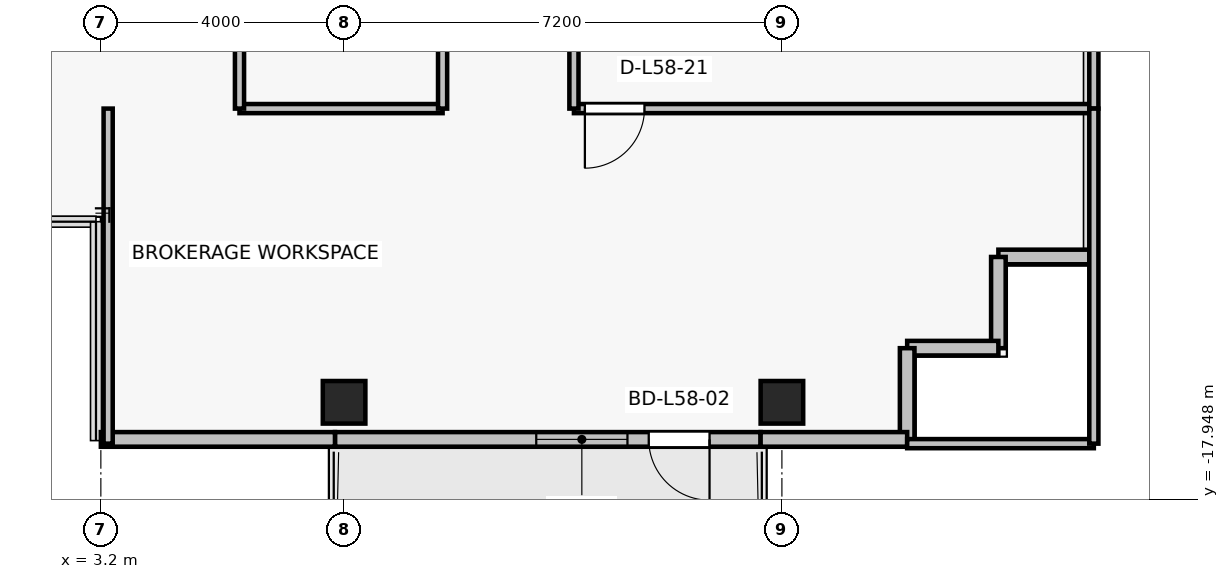
"""IFC4 building model, lengths in metres.
Left out: names, types, materials, properties, quantities, classifications, styles, units other than length and angle.
Written with IfcOpenShell. Run it as: python <this file> out.ifc"""

import sys

from ifc_helpers import new_model, si_unit, direction, frame, frame_2d, origin, origin_2d, place, context, subcontext, project, spatial, rectangle, extrude, source, transform, mapped, element, fill, save


model = new_model("IFC4")
c1 = context("Model", 3, precision=1e-05, world=origin(), true_north=direction((0.0, 1.0)))
c2 = subcontext(c1, "Body", "Model", "MODEL_VIEW")
j1 = project(units=[si_unit("LENGTHUNIT", "METRE"), si_unit("PLANEANGLEUNIT", "RADIAN")], contexts=[c1])
p1 = place(None, origin())
s1 = spatial("IfcSite", under=j1, at=p1, CompositionType="ELEMENT")
p2 = place(p1, origin())
s2 = spatial("IfcBuilding", under=s1, at=p2, CompositionType="ELEMENT")
p3 = place(p2, frame((0.0, 0.0, 208.9)))
s3 = spatial("IfcBuildingStorey", under=s2, at=p3, CompositionType="ELEMENT", Elevation=208.9)
for number, where, z_axis, x_axis in (
    (1, (7.2, -16.35, 0.0), (0.0, 0.0, 1.0), (1.0, 0.0, 0.0)),
    (2, (14.4, -16.35, 0.0), (0.0, 0.0, 1.0), (1.0, 0.0, 0.0)),
):
    element("IfcColumn", number, at=place(p3, frame(where, z_axis=z_axis, x_axis=x_axis)), inside=s3, PredefinedType="COLUMN", context=c2, shape_type="SweptSolid", body=[
        extrude(rectangle(XDim=0.7, YDim=0.7, at=origin_2d()), origin(), (0.0, 0.0, 1.0), 3.3),
    ])
p4 = place(p3, frame((14.05, -16.96, 0.0), z_axis=(0.0, 0.0, 1.0), x_axis=(-1.0, 0.0, 0.0)))
e3 = element("IfcWall", 3, at=p4, inside=s3, PredefinedType="SOLIDWALL", context=c2, shape_type="SweptSolid", body=[
    extrude(rectangle(XDim=7.0, YDim=0.24, at=frame_2d((3.5, 0.0))), origin(), (0.0, 0.0, 1.0), 2.665),
])
p5 = place(p4, frame((0.84, 0.0, 0.0)))
e4 = element("IfcOpeningElement", 4, at=p5, cuts=e3, PredefinedType="OPENING", context=c2, shape_type="SweptSolid", body=[
    extrude(rectangle(XDim=1.0, YDim=2.2, at=frame_2d((0.5, 1.1))), frame((0.0, 0.13, 0.0), z_axis=(0.0, -1.0, 0.0), x_axis=(1.0, 0.0, 0.0)), (0.0, 0.0, 1.0), 0.26),
])
p6 = place(p4, frame((2.19, 0.0, 0.85)))
e5 = element("IfcOpeningElement", 5, at=p6, cuts=e3, PredefinedType="OPENING", context=c2, shape_type="SweptSolid", body=[
    extrude(rectangle(XDim=1.5, YDim=1.6, at=frame_2d((0.75, 0.8))), frame((0.0, 0.13, 0.0), z_axis=(0.0, -1.0, 0.0), x_axis=(1.0, 0.0, 0.0)), (0.0, 0.0, 1.0), 0.26),
])
for number, where, z_axis, x_axis in (
    (6, (17.96, -13.96, 0.0), (0.0, 0.0, 1.0), (1.0, 0.0, 0.0)),
    (7, (17.96, -15.46, 0.0), (0.0, 0.0, 1.0), (0.0, 1.0, 0.0)),
    (8, (16.46, -15.46, 0.0), (0.0, 0.0, 1.0), (1.0, 0.0, 0.0)),
    (9, (16.46, -16.96, 0.0), (0.0, 0.0, 1.0), (0.0, 1.0, 0.0)),
):
    element("IfcWall", number, at=place(p3, frame(where, z_axis=z_axis, x_axis=x_axis)), inside=s3, PredefinedType="SOLIDWALL", context=c2, shape_type="SweptSolid", body=[
        extrude(rectangle(XDim=1.5, YDim=0.24, at=frame_2d((0.75, 0.0))), origin(), (0.0, 0.0, 1.0), 3.075),
    ])
p7 = place(p3, frame((14.05, -16.96, 0.0), z_axis=(0.0, 0.0, 1.0), x_axis=(1.0, 0.0, 0.0)))
e10 = element("IfcWall", 10, at=p7, inside=s3, PredefinedType="SOLIDWALL", context=c2, shape_type="SweptSolid", body=[
    extrude(rectangle(XDim=2.41, YDim=0.24, at=frame_2d((1.205, 0.0))), origin(), (0.0, 0.0, 1.0), 3.075),
])
p8 = place(p3, frame((3.2, -16.96, 0.0), z_axis=(0.0, 0.0, 1.0), x_axis=(1.0, 0.0, 0.0)))
e11 = element("IfcWall", 11, at=p8, inside=s3, PredefinedType="SOLIDWALL", context=c2, shape_type="SweptSolid", body=[
    extrude(rectangle(XDim=3.85, YDim=0.24, at=frame_2d((1.925, 0.0))), origin(), (0.0, 0.0, 1.0), 3.075),
])
p9 = place(p3, frame((19.53, -11.52, 0.0), z_axis=(0.0, 0.0, 1.0), x_axis=(-1.0, 0.0, 0.0)))
e12 = element("IfcWall", 12, at=p9, inside=s3, PredefinedType="PARTITIONING", context=c2, shape_type="SweptSolid", body=[
    extrude(rectangle(XDim=8.55, YDim=0.15, at=frame_2d((4.275, 0.0))), origin(), (0.0, 0.0, 1.0), 2.615),
])
p10 = place(p9, frame((7.39, 0.0, 0.0)))
e13 = element("IfcOpeningElement", 13, at=p10, cuts=e12, PredefinedType="OPENING", context=c2, shape_type="SweptSolid", body=[
    extrude(rectangle(XDim=0.98, YDim=2.15, at=frame_2d((0.49, 1.075))), frame((0.0, 0.085, 0.0), z_axis=(0.0, -1.0, 0.0), x_axis=(1.0, 0.0, 0.0)), (0.0, 0.0, 1.0), 0.17),
])
p11 = place(p3, frame((10.98, -11.52, 0.0), z_axis=(0.0, 0.0, 1.0), x_axis=(0.0, 1.0, 0.0)))
e14 = element("IfcWall", 14, at=p11, inside=s3, PredefinedType="PARTITIONING", context=c2, shape_type="SweptSolid", body=[
    extrude(rectangle(XDim=7.69, YDim=0.15, at=frame_2d((3.845, 0.0))), origin(), (0.0, 0.0, 1.0), 2.615),
])
p12 = place(p3, frame((19.53, -3.83, 0.0), z_axis=(0.0, 0.0, 1.0), x_axis=(0.0, -1.0, 0.0)))
e15 = element("IfcWall", 15, at=p12, inside=s3, PredefinedType="PARTITIONING", context=c2, shape_type="SweptSolid", body=[
    extrude(rectangle(XDim=7.69, YDim=0.15, at=frame_2d((3.845, 0.0))), origin(), (0.0, 0.0, 1.0), 2.665),
])
p13 = place(p3, frame((19.53, -17.03, 0.0), z_axis=(0.0, 0.0, 1.0), x_axis=(-1.0, 0.0, 0.0)))
e16 = element("IfcWall", 16, at=p13, inside=s3, PredefinedType="PARTITIONING", context=c2, shape_type="SweptSolid", body=[
    extrude(rectangle(XDim=3.07, YDim=0.15, at=frame_2d((1.535, 0.0))), origin(), (0.0, 0.0, 1.0), 2.665),
])
p14 = place(p3, frame((3.32, -17.03, 0.0), z_axis=(0.0, 0.0, 1.0), x_axis=(0.0, 1.0, 0.0)))
e17 = element("IfcWall", 17, at=p14, inside=s3, PredefinedType="PARTITIONING", context=c2, shape_type="SweptSolid", body=[
    extrude(rectangle(XDim=5.51, YDim=0.15, at=frame_2d((2.755, 0.0))), origin(), (0.0, 0.0, 1.0), 2.615),
])
p15 = place(p3, frame((19.53, -11.52, 0.0), z_axis=(0.0, 0.0, 1.0), x_axis=(0.0, -1.0, 0.0)))
e18 = element("IfcWall", 18, at=p15, inside=s3, PredefinedType="PARTITIONING", context=c2, shape_type="SweptSolid", body=[
    extrude(rectangle(XDim=5.51, YDim=0.15, at=frame_2d((2.755, 0.0))), origin(), (0.0, 0.0, 1.0), 3.075),
])
p16 = place(p3, frame((8.82, -11.52, 0.0), z_axis=(0.0, 0.0, 1.0), x_axis=(-1.0, 0.0, 0.0)))
e19 = element("IfcWall", 19, at=p16, inside=s3, PredefinedType="PARTITIONING", context=c2, shape_type="SweptSolid", body=[
    extrude(rectangle(XDim=3.34, YDim=0.15, at=frame_2d((1.67, 0.0))), origin(), (0.0, 0.0, 1.0), 2.615),
])
p17 = place(p3, frame((5.48, -11.52, 0.0), z_axis=(0.0, 0.0, 1.0), x_axis=(0.0, 1.0, 0.0)))
e20 = element("IfcWall", 20, at=p17, inside=s3, PredefinedType="PARTITIONING", context=c2, shape_type="SweptSolid", body=[
    extrude(rectangle(XDim=7.69, YDim=0.15, at=frame_2d((3.845, 0.0))), origin(), (0.0, 0.0, 1.0), 2.615),
])
p18 = place(p3, frame((8.82, -3.83, 0.0), z_axis=(0.0, 0.0, 1.0), x_axis=(0.0, -1.0, 0.0)))
e21 = element("IfcWall", 21, at=p18, inside=s3, PredefinedType="PARTITIONING", context=c2, shape_type="SweptSolid", body=[
    extrude(rectangle(XDim=7.69, YDim=0.15, at=frame_2d((3.845, 0.0))), origin(), (0.0, 0.0, 1.0), 2.615),
])
p19 = place(p18, frame((2.835, 0.0, 0.0)))
e22 = element("IfcOpeningElement", 22, at=p19, cuts=e21, PredefinedType="OPENING", context=c2, shape_type="SweptSolid", body=[
    extrude(rectangle(XDim=0.98, YDim=2.15, at=frame_2d((0.49, 1.075))), frame((0.0, 0.085, 0.0), z_axis=(0.0, -1.0, 0.0), x_axis=(1.0, 0.0, 0.0)), (0.0, 0.0, 1.0), 0.17),
])
m1 = source(origin(), c2, "Body", "SweptSolid", [
    extrude(rectangle(XDim=1.0, YDim=2.2, at=frame_2d((0.5, 1.1))), frame((0.0, 0.025, 0.0), z_axis=(0.0, -1.0, 0.0), x_axis=(1.0, 0.0, 0.0)), (0.0, 0.0, 1.0), 0.05),
])
p20 = place(p5, origin())
e23 = element("IfcDoor", 23, at=p20, inside=s3, OperationType="SINGLE_SWING_LEFT", PredefinedType="DOOR", context=c2, shape_type="MappedRepresentation", body=[
    mapped(m1, transform((0.0, 0.0, 0.0), x_axis=(1.0, 0.0, 0.0), y_axis=(0.0, 1.0, 0.0), z_axis=(0.0, 0.0, 1.0), scale=1.0)),
])
fill(e4, e23)
m2 = source(origin(), c2, "Body", "SweptSolid", [
    extrude(rectangle(XDim=1.5, YDim=1.6, at=frame_2d((0.75, 0.8))), frame((0.0, 0.03, 0.0), z_axis=(0.0, -1.0, 0.0), x_axis=(1.0, 0.0, 0.0)), (0.0, 0.0, 1.0), 0.06),
])
p21 = place(p6, origin())
e24 = element("IfcWindow", 24, at=p21, inside=s3, PartitioningType="SINGLE_PANEL", PredefinedType="WINDOW", context=c2, shape_type="MappedRepresentation", body=[
    mapped(m2, transform((0.0, 0.0, 0.0), x_axis=(1.0, 0.0, 0.0), y_axis=(0.0, 1.0, 0.0), z_axis=(0.0, 0.0, 1.0), scale=1.0)),
])
fill(e5, e24)
m3 = source(origin(), c2, "Body", "SweptSolid", [
    extrude(rectangle(XDim=0.98, YDim=2.15, at=frame_2d((0.49, 1.075))), frame((0.0, 0.025, 0.0), z_axis=(0.0, -1.0, 0.0), x_axis=(1.0, 0.0, 0.0)), (0.0, 0.0, 1.0), 0.05),
])
p22 = place(p10, origin())
e25 = element("IfcDoor", 25, at=p22, inside=s3, OperationType="SINGLE_SWING_RIGHT", PredefinedType="DOOR", context=c2, shape_type="MappedRepresentation", body=[
    mapped(m3, transform((0.0, 0.0, 0.0), x_axis=(1.0, 0.0, 0.0), y_axis=(0.0, 1.0, 0.0), z_axis=(0.0, 0.0, 1.0), scale=1.0)),
])
fill(e13, e25)
save(model, sys.argv[1])
